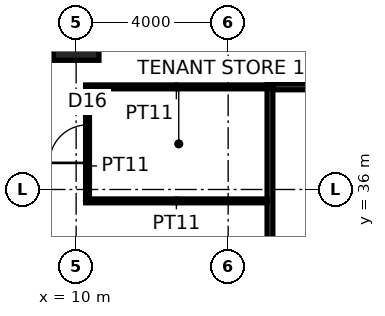
"""IFC4 building model, lengths in metres.
Left out: names, types, materials, properties, quantities, classifications, styles, units other than length and angle.
Written with IfcOpenShell. Run it as: python <this file> out.ifc"""

import sys

from ifc_helpers import new_model, si_unit, direction, frame, frame_2d, origin, origin_2d, place, context, subcontext, project, spatial, rectangle, hollow_rectangle, extrude, element, fill, save


model = new_model("IFC4")
c1 = context("Model", 3, precision=1e-05, world=origin(), true_north=direction((0.0, 1.0)))
c2 = subcontext(c1, "Body", "Model", "MODEL_VIEW")
j1 = project(units=[si_unit("LENGTHUNIT", "METRE"), si_unit("PLANEANGLEUNIT", "RADIAN")], contexts=[c1])
p1 = place(None, origin())
s1 = spatial("IfcSite", under=j1, at=p1, CompositionType="ELEMENT")
p2 = place(p1, origin())
s2 = spatial("IfcBuilding", under=s1, at=p2, CompositionType="ELEMENT")
p3 = place(p2, frame((0.0, 0.0, 47.0)))
s3 = spatial("IfcBuildingStorey", under=s2, at=p3, CompositionType="ELEMENT", Elevation=47.0)
p4 = place(p3, frame((10.0, 40.0, 0.0), z_axis=(0.0, 0.0, 1.0), x_axis=(1.0, 0.0, 0.0)))
e1 = element("IfcColumn", 1, at=p4, inside=s3, PredefinedType="COLUMN", context=c2, shape_type="SweptSolid", body=[
    extrude(hollow_rectangle(XDim=1.2, YDim=1.2, WallThickness=0.1, at=origin_2d()), origin(), (0.0, 0.0, 1.0), 4.0),
])
p5 = place(p3, frame((15.1, 15.225, 0.0), z_axis=(0.0, 0.0, 1.0), x_axis=(0.0, 1.0, 0.0)))
e2 = element("IfcWall", 2, at=p5, inside=s3, PredefinedType="PARTITIONING", context=c2, shape_type="SweptSolid", body=[
    extrude(rectangle(XDim=23.55, YDim=0.15, at=frame_2d((11.775, 0.0))), origin(), (0.0, 0.0, 1.0), 3.85),
])
p6 = place(p5, frame((10.875, 0.0, 0.0)))
e3 = element("IfcOpeningElement", 3, at=p6, cuts=e2, PredefinedType="OPENING", context=c2, shape_type="SweptSolid", body=[
    extrude(rectangle(XDim=1.8, YDim=2.4, at=frame_2d((0.9, 1.2))), frame((0.0, 0.085, 0.0), z_axis=(0.0, -1.0, 0.0), x_axis=(1.0, 0.0, 0.0)), (0.0, 0.0, 1.0), 0.17),
])
p7 = place(p3, frame((15.175, 38.7, 0.0), z_axis=(0.0, 0.0, 1.0), x_axis=(1.0, 0.0, 0.0)))
e4 = element("IfcWall", 4, at=p7, inside=s3, PredefinedType="PARTITIONING", context=c2, shape_type="SweptSolid", body=[
    extrude(rectangle(XDim=29.05, YDim=0.15, at=frame_2d((14.525, 0.0))), origin(), (0.0, 0.0, 1.0), 3.85),
])
p8 = place(p7, frame((8.575, 0.0, 0.0)))
e5 = element("IfcOpeningElement", 5, at=p8, cuts=e4, PredefinedType="OPENING", context=c2, shape_type="SweptSolid", body=[
    extrude(rectangle(XDim=0.9, YDim=2.1, at=frame_2d((0.45, 1.05))), frame((0.0, 0.085, 0.0), z_axis=(0.0, -1.0, 0.0), x_axis=(1.0, 0.0, 0.0)), (0.0, 0.0, 1.0), 0.17),
])
p9 = place(p7, frame((12.325, 0.0, 0.0)))
e6 = element("IfcOpeningElement", 6, at=p9, cuts=e4, PredefinedType="OPENING", context=c2, shape_type="SweptSolid", body=[
    extrude(rectangle(XDim=1.0, YDim=2.1, at=frame_2d((0.5, 1.05))), frame((0.0, 0.085, 0.0), z_axis=(0.0, -1.0, 0.0), x_axis=(1.0, 0.0, 0.0)), (0.0, 0.0, 1.0), 0.17),
])
p10 = place(p7, frame((16.175, 0.0, 0.0)))
e7 = element("IfcOpeningElement", 7, at=p10, cuts=e4, PredefinedType="OPENING", context=c2, shape_type="SweptSolid", body=[
    extrude(rectangle(XDim=0.9, YDim=2.1, at=frame_2d((0.45, 1.05))), frame((0.0, 0.085, 0.0), z_axis=(0.0, -1.0, 0.0), x_axis=(1.0, 0.0, 0.0)), (0.0, 0.0, 1.0), 0.17),
])
p11 = place(p3, frame((10.25, 35.7, 0.0), z_axis=(0.0, 0.0, 1.0), x_axis=(1.0, 0.0, 0.0)))
e8 = element("IfcWall", 8, at=p11, inside=s3, PredefinedType="PARTITIONING", context=c2, shape_type="SweptSolid", body=[
    extrude(rectangle(XDim=4.775, YDim=0.1, at=frame_2d((2.387, 0.0))), origin(), (0.0, 0.0, 1.0), 2.85),
])
p12 = place(p3, frame((10.25, 38.7, 0.0), z_axis=(0.0, 0.0, 1.0), x_axis=(1.0, 0.0, 0.0)))
e9 = element("IfcWall", 9, at=p12, inside=s3, PredefinedType="PARTITIONING", context=c2, shape_type="SweptSolid", body=[
    extrude(rectangle(XDim=4.775, YDim=0.1, at=frame_2d((2.387, 0.0))), origin(), (0.0, 0.0, 1.0), 3.85),
])
p13 = place(p3, frame((10.3, 35.75, 0.0), z_axis=(0.0, 0.0, 1.0), x_axis=(0.0, 1.0, 0.0)))
e10 = element("IfcWall", 10, at=p13, inside=s3, PredefinedType="PARTITIONING", context=c2, shape_type="SweptSolid", body=[
    extrude(rectangle(XDim=2.9, YDim=0.1, at=frame_2d((1.45, 0.0))), origin(), (0.0, 0.0, 1.0), 2.95),
])
p14 = place(p13, frame((0.95, 0.0, 0.0)))
e11 = element("IfcOpeningElement", 11, at=p14, cuts=e10, PredefinedType="OPENING", context=c2, shape_type="SweptSolid", body=[
    extrude(rectangle(XDim=1.0, YDim=2.2, at=frame_2d((0.5, 1.1))), frame((0.0, 0.06, 0.0), z_axis=(0.0, -1.0, 0.0), x_axis=(1.0, 0.0, 0.0)), (0.0, 0.0, 1.0), 0.12),
])
p15 = place(p14, origin())
e12 = element("IfcDoor", 12, at=p15, inside=s3, OperationType="SINGLE_SWING_LEFT", PredefinedType="DOOR", context=c2, shape_type="SweptSolid", body=[
    extrude(rectangle(XDim=1.0, YDim=2.2, at=frame_2d((0.5, 1.1))), frame((0.0, 0.025, 0.0), z_axis=(0.0, -1.0, 0.0), x_axis=(1.0, 0.0, 0.0)), (0.0, 0.0, 1.0), 0.05),
])
fill(e11, e12)
save(model, sys.argv[1])
